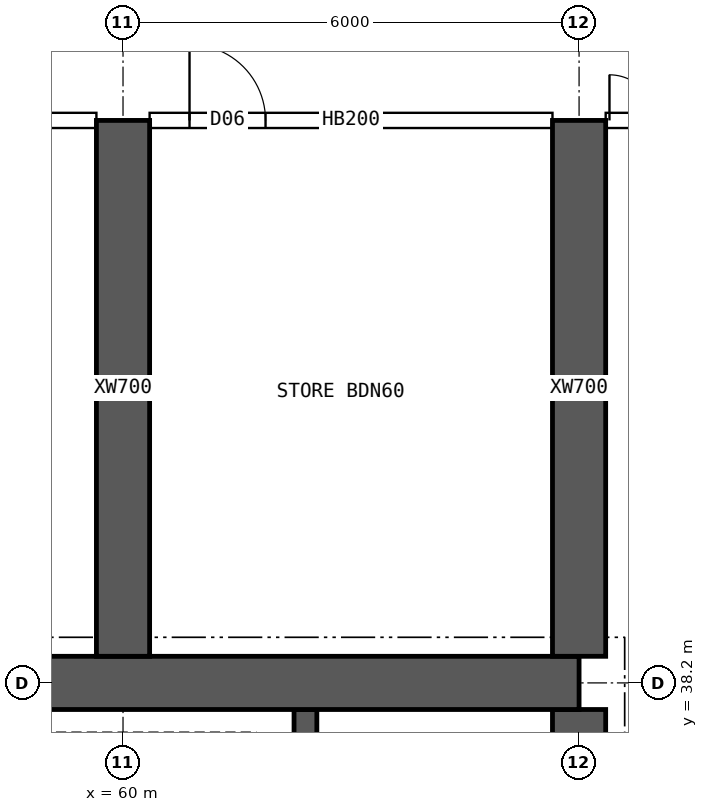
"""IFC4 building model, lengths in metres.
Left out: names, types, materials, properties, quantities, classifications, styles, units other than length and angle.
Written with IfcOpenShell. Run it as: python <this file> out.ifc"""

import sys

from ifc_helpers import new_model, si_unit, direction, frame, frame_2d, origin, place, context, subcontext, project, spatial, rectangle, extrude, element, fill, save


model = new_model("IFC4")
c1 = context("Model", 3, precision=1e-05, world=origin(), true_north=direction((0.0, 1.0)))
c2 = subcontext(c1, "Body", "Model", "MODEL_VIEW")
j1 = project(units=[si_unit("LENGTHUNIT", "METRE"), si_unit("PLANEANGLEUNIT", "RADIAN")], contexts=[c1])
p1 = place(None, origin())
s1 = spatial("IfcSite", under=j1, at=p1, CompositionType="ELEMENT")
p2 = place(p1, origin())
s2 = spatial("IfcBuilding", under=s1, at=p2, CompositionType="ELEMENT")
p3 = place(p2, frame((0.0, 0.0, 246.55)))
s3 = spatial("IfcBuildingStorey", under=s2, at=p3, CompositionType="ELEMENT", Elevation=246.55)
p4 = place(p3, frame((18.0, 38.2, 0.0), z_axis=(0.0, 0.0, 1.0), x_axis=(1.0, 0.0, 0.0)))
e1 = element("IfcWall", 1, at=p4, inside=s3, PredefinedType="SHEAR", context=c2, shape_type="SweptSolid", body=[
    extrude(rectangle(XDim=48.0, YDim=0.7, at=frame_2d((24.0, 0.0))), origin(), (0.0, 0.0, 1.0), 3.75),
])
p5 = place(p3, frame((66.0, 26.15, 0.0), z_axis=(0.0, 0.0, 1.0), x_axis=(0.0, 1.0, 0.0)))
e2 = element("IfcWall", 2, at=p5, inside=s3, PredefinedType="SHEAR", context=c2, shape_type="SweptSolid", body=[
    extrude(rectangle(XDim=11.7, YDim=0.7, at=frame_2d((5.85, 0.0))), origin(), (0.0, 0.0, 1.0), 3.75),
])
p6 = place(p5, frame((5.15, 0.0, 0.0)))
e3 = element("IfcOpeningElement", 3, at=p6, cuts=e2, PredefinedType="OPENING", context=c2, shape_type="SweptSolid", body=[
    extrude(rectangle(XDim=1.2, YDim=2.1, at=frame_2d((0.6, 1.05))), frame((0.0, 0.36, 0.0), z_axis=(0.0, -1.0, 0.0), x_axis=(1.0, 0.0, 0.0)), (0.0, 0.0, 1.0), 0.72),
])
p7 = place(p3, frame((62.4, 34.75, 0.0), z_axis=(0.0, 0.0, 1.0), x_axis=(0.0, 1.0, 0.0)))
e4 = element("IfcWall", 4, at=p7, inside=s3, PredefinedType="SHEAR", context=c2, shape_type="SweptSolid", body=[
    extrude(rectangle(XDim=3.1, YDim=0.3, at=frame_2d((1.55, 0.0))), origin(), (0.0, 0.0, 1.0), 3.75),
])
for number, where, z_axis, x_axis in (
    (5, (60.0, 38.55, 0.0), (0.0, 0.0, 1.0), (0.0, 1.0, 0.0)),
    (6, (66.0, 38.55, 0.0), (0.0, 0.0, 1.0), (0.0, 1.0, 0.0)),
):
    element("IfcWall", number, at=place(p3, frame(where, z_axis=z_axis, x_axis=x_axis)), inside=s3, PredefinedType="SHEAR", context=c2, shape_type="SweptSolid", body=[
        extrude(rectangle(XDim=7.05, YDim=0.7, at=frame_2d((3.525, 0.0))), origin(), (0.0, 0.0, 1.0), 3.75),
    ])
p8 = place(p3, frame((54.35, 45.6, 0.0), z_axis=(0.0, 0.0, 1.0), x_axis=(1.0, 0.0, 0.0)))
e7 = element("IfcWall", 7, at=p8, inside=s3, PredefinedType="SOLIDWALL", context=c2, shape_type="SweptSolid", body=[
    extrude(rectangle(XDim=5.3, YDim=0.2, at=frame_2d((2.65, 0.0))), origin(), (0.0, 0.0, 1.0), 3.5),
])
p9 = place(p8, frame((0.35, 0.0, 0.0)))
e8 = element("IfcOpeningElement", 8, at=p9, cuts=e7, PredefinedType="OPENING", context=c2, shape_type="SweptSolid", body=[
    extrude(rectangle(XDim=0.9, YDim=2.1, at=frame_2d((0.45, 1.05))), frame((0.0, 0.11, 0.0), z_axis=(0.0, -1.0, 0.0), x_axis=(1.0, 0.0, 0.0)), (0.0, 0.0, 1.0), 0.22),
])
p10 = place(p8, frame((2.775, 0.0, 0.0)))
e9 = element("IfcOpeningElement", 9, at=p10, cuts=e7, PredefinedType="OPENING", context=c2, shape_type="SweptSolid", body=[
    extrude(rectangle(XDim=0.9, YDim=2.1, at=frame_2d((0.45, 1.05))), frame((0.0, 0.11, 0.0), z_axis=(0.0, -1.0, 0.0), x_axis=(1.0, 0.0, 0.0)), (0.0, 0.0, 1.0), 0.22),
])
p11 = place(p3, frame((60.35, 45.6, 0.0), z_axis=(0.0, 0.0, 1.0), x_axis=(1.0, 0.0, 0.0)))
e10 = element("IfcWall", 10, at=p11, inside=s3, PredefinedType="SOLIDWALL", context=c2, shape_type="SweptSolid", body=[
    extrude(rectangle(XDim=5.3, YDim=0.2, at=frame_2d((2.65, 0.0))), origin(), (0.0, 0.0, 1.0), 3.5),
])
p12 = place(p11, frame((0.525, 0.0, 0.0)))
e11 = element("IfcOpeningElement", 11, at=p12, cuts=e10, PredefinedType="OPENING", context=c2, shape_type="SweptSolid", body=[
    extrude(rectangle(XDim=1.0, YDim=2.1, at=frame_2d((0.5, 1.05))), frame((0.0, 0.11, 0.0), z_axis=(0.0, -1.0, 0.0), x_axis=(1.0, 0.0, 0.0)), (0.0, 0.0, 1.0), 0.22),
])
p13 = place(p3, frame((66.35, 45.6, 0.0), z_axis=(0.0, 0.0, 1.0), x_axis=(1.0, 0.0, 0.0)))
e12 = element("IfcWall", 12, at=p13, inside=s3, PredefinedType="SOLIDWALL", context=c2, shape_type="SweptSolid", body=[
    extrude(rectangle(XDim=2.05, YDim=0.2, at=frame_2d((1.025, 0.0))), origin(), (0.0, 0.0, 1.0), 3.5),
])
p14 = place(p13, frame((0.05, 0.0, 0.0)))
e13 = element("IfcOpeningElement", 13, at=p14, cuts=e12, PredefinedType="OPENING", context=c2, shape_type="SweptSolid", body=[
    extrude(rectangle(XDim=1.2, YDim=2.1, at=frame_2d((0.6, 1.05))), frame((0.0, 0.11, 0.0), z_axis=(0.0, -1.0, 0.0), x_axis=(1.0, 0.0, 0.0)), (0.0, 0.0, 1.0), 0.22),
])
p15 = place(p14, origin())
e14 = element("IfcDoor", 14, at=p15, inside=s3, OperationType="DOUBLE_DOOR_SINGLE_SWING", PredefinedType="DOOR", context=c2, shape_type="SweptSolid", body=[
    extrude(rectangle(XDim=1.2, YDim=2.1, at=frame_2d((0.6, 1.05))), frame((0.0, 0.025, 0.0), z_axis=(0.0, -1.0, 0.0), x_axis=(1.0, 0.0, 0.0)), (0.0, 0.0, 1.0), 0.05),
])
fill(e13, e14)
p16 = place(p12, origin())
e15 = element("IfcDoor", 15, at=p16, inside=s3, OperationType="SINGLE_SWING_LEFT", PredefinedType="DOOR", context=c2, shape_type="SweptSolid", body=[
    extrude(rectangle(XDim=1.0, YDim=2.1, at=frame_2d((0.5, 1.05))), frame((0.0, 0.025, 0.0), z_axis=(0.0, -1.0, 0.0), x_axis=(1.0, 0.0, 0.0)), (0.0, 0.0, 1.0), 0.05),
])
fill(e11, e15)
save(model, sys.argv[1])
